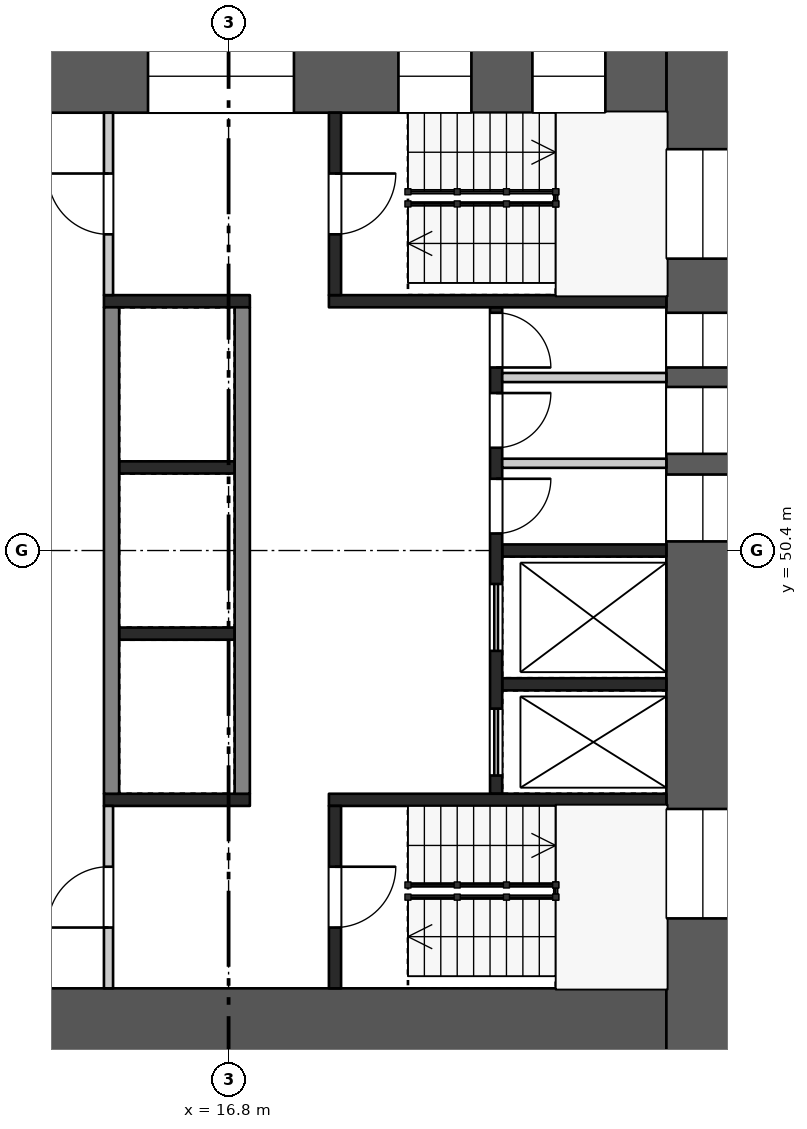
"""IFC4 building model, lengths in metres.
Left out: names, types, materials, properties, quantities, classifications, styles, units other than length and angle.
Written with IfcOpenShell. Run it as: python <this file> out.ifc"""

import sys

from ifc_helpers import new_model, si_unit, direction, frame, frame_2d, origin, place, context, subcontext, project, spatial, rectangle, extrude, element, fill, save


model = new_model("IFC4")
c1 = context("Model", 3, precision=1e-05, world=origin(), true_north=direction((0.0, 1.0)))
c2 = subcontext(c1, "Body", "Model", "MODEL_VIEW")
j1 = project(units=[si_unit("LENGTHUNIT", "METRE"), si_unit("PLANEANGLEUNIT", "RADIAN")], contexts=[c1])
p1 = place(None, origin())
s1 = spatial("IfcSite", under=j1, at=p1, CompositionType="ELEMENT")
p2 = place(p1, origin())
s2 = spatial("IfcBuilding", under=s1, at=p2, CompositionType="ELEMENT")
p3 = place(p2, frame((0.0, 0.0, 56.7)))
s3 = spatial("IfcBuildingStorey", under=s2, at=p3, CompositionType="ELEMENT", Elevation=56.7)
p4 = place(p3, frame((24.6, 58.8, 0.0), z_axis=(0.0, 0.0, 1.0), x_axis=(0.0, -1.0, 0.0)))
e1 = element("IfcWall", 1, at=p4, inside=s3, PredefinedType="SHEAR", context=c2, shape_type="SweptSolid", body=[
    extrude(rectangle(XDim=16.8, YDim=1.2, at=frame_2d((8.4, 0.0))), origin(), (0.0, 0.0, 1.0), 3.22),
])
p5 = place(p4, frame((1.8, 0.0, 0.5)))
e2 = element("IfcOpeningElement", 2, at=p5, cuts=e1, PredefinedType="OPENING", context=c2, shape_type="SweptSolid", body=[
    extrude(rectangle(XDim=1.8, YDim=2.4, at=frame_2d((0.9, 1.2))), frame((0.0, 0.61, 0.0), z_axis=(0.0, -1.0, 0.0), x_axis=(1.0, 0.0, 0.0)), (0.0, 0.0, 1.0), 1.22),
])
p6 = place(p4, frame((4.49, 0.0, 1.6)))
e3 = element("IfcOpeningElement", 3, at=p6, cuts=e1, PredefinedType="OPENING", context=c2, shape_type="SweptSolid", body=[
    extrude(rectangle(XDim=0.9, YDim=1.2, at=frame_2d((0.45, 0.6))), frame((0.0, 0.61, 0.0), z_axis=(0.0, -1.0, 0.0), x_axis=(1.0, 0.0, 0.0)), (0.0, 0.0, 1.0), 1.22),
])
p7 = place(p4, frame((5.71, 0.0, 1.6)))
e4 = element("IfcOpeningElement", 4, at=p7, cuts=e1, PredefinedType="OPENING", context=c2, shape_type="SweptSolid", body=[
    extrude(rectangle(XDim=1.1, YDim=1.2, at=frame_2d((0.55, 0.6))), frame((0.0, 0.61, 0.0), z_axis=(0.0, -1.0, 0.0), x_axis=(1.0, 0.0, 0.0)), (0.0, 0.0, 1.0), 1.22),
])
p8 = place(p4, frame((7.15, 0.0, 1.6)))
e5 = element("IfcOpeningElement", 5, at=p8, cuts=e1, PredefinedType="OPENING", context=c2, shape_type="SweptSolid", body=[
    extrude(rectangle(XDim=1.1, YDim=1.2, at=frame_2d((0.55, 0.6))), frame((0.0, 0.61, 0.0), z_axis=(0.0, -1.0, 0.0), x_axis=(1.0, 0.0, 0.0)), (0.0, 0.0, 1.0), 1.22),
])
p9 = place(p4, frame((12.65, 0.0, 0.5)))
e6 = element("IfcOpeningElement", 6, at=p9, cuts=e1, PredefinedType="OPENING", context=c2, shape_type="SweptSolid", body=[
    extrude(rectangle(XDim=1.8, YDim=2.4, at=frame_2d((0.9, 1.2))), frame((0.0, 0.61, 0.0), z_axis=(0.0, -1.0, 0.0), x_axis=(1.0, 0.0, 0.0)), (0.0, 0.0, 1.0), 1.22),
])
p10 = place(p3, frame((9.6, 58.2, 0.0), z_axis=(0.0, 0.0, 1.0), x_axis=(1.0, 0.0, 0.0)))
e7 = element("IfcWall", 7, at=p10, inside=s3, PredefinedType="SHEAR", context=c2, shape_type="SweptSolid", body=[
    extrude(rectangle(XDim=14.4, YDim=1.2, at=frame_2d((7.2, 0.0))), origin(), (0.0, 0.0, 1.0), 3.22),
])
p11 = place(p10, frame((1.105, 0.0, 0.6)))
e8 = element("IfcOpeningElement", 8, at=p11, cuts=e7, PredefinedType="OPENING", context=c2, shape_type="SweptSolid", body=[
    extrude(rectangle(XDim=3.0, YDim=2.1, at=frame_2d((1.5, 1.05))), frame((0.0, 0.61, 0.0), z_axis=(0.0, -1.0, 0.0), x_axis=(1.0, 0.0, 0.0)), (0.0, 0.0, 1.0), 1.22),
])
p12 = place(p10, frame((5.875, 0.0, 0.6)))
e9 = element("IfcOpeningElement", 9, at=p12, cuts=e7, PredefinedType="OPENING", context=c2, shape_type="SweptSolid", body=[
    extrude(rectangle(XDim=2.4, YDim=2.1, at=frame_2d((1.2, 1.05))), frame((0.0, 0.61, 0.0), z_axis=(0.0, -1.0, 0.0), x_axis=(1.0, 0.0, 0.0)), (0.0, 0.0, 1.0), 1.22),
])
p13 = place(p10, frame((9.993, 0.0, 0.5)))
e10 = element("IfcOpeningElement", 10, at=p13, cuts=e7, PredefinedType="OPENING", context=c2, shape_type="SweptSolid", body=[
    extrude(rectangle(XDim=1.2, YDim=2.4, at=frame_2d((0.6, 1.2))), frame((0.0, 0.61, 0.0), z_axis=(0.0, -1.0, 0.0), x_axis=(1.0, 0.0, 0.0)), (0.0, 0.0, 1.0), 1.22),
])
p14 = place(p10, frame((12.197, 0.0, 0.5)))
e11 = element("IfcOpeningElement", 11, at=p14, cuts=e7, PredefinedType="OPENING", context=c2, shape_type="SweptSolid", body=[
    extrude(rectangle(XDim=1.2, YDim=2.4, at=frame_2d((0.6, 1.2))), frame((0.0, 0.61, 0.0), z_axis=(0.0, -1.0, 0.0), x_axis=(1.0, 0.0, 0.0)), (0.0, 0.0, 1.0), 1.22),
])
p15 = place(p3, frame((9.6, 42.6, 0.0), z_axis=(0.0, 0.0, 1.0), x_axis=(1.0, 0.0, 0.0)))
e12 = element("IfcWall", 12, at=p15, inside=s3, PredefinedType="SHEAR", context=c2, shape_type="SweptSolid", body=[
    extrude(rectangle(XDim=14.4, YDim=1.2, at=frame_2d((7.2, 0.0))), origin(), (0.0, 0.0, 1.0), 3.22),
])
p16 = place(p15, frame((2.1, 0.0, 0.0)))
e13 = element("IfcOpeningElement", 13, at=p16, cuts=e12, PredefinedType="OPENING", context=c2, shape_type="SweptSolid", body=[
    extrude(rectangle(XDim=1.8, YDim=2.1, at=frame_2d((0.9, 1.05))), frame((0.0, 0.61, 0.0), z_axis=(0.0, -1.0, 0.0), x_axis=(1.0, 0.0, 0.0)), (0.0, 0.0, 1.0), 1.22),
])
for number, where, z_axis, x_axis in (
    (14, (15.0, 51.767, 0.0), (0.0, 0.0, 1.0), (1.0, 0.0, 0.0)),
    (15, (15.0, 49.033, 0.0), (0.0, 0.0, 1.0), (1.0, 0.0, 0.0)),
):
    element("IfcWall", number, at=place(p3, frame(where, z_axis=z_axis, x_axis=x_axis)), inside=s3, PredefinedType="SHEAR", context=c2, shape_type="SweptSolid", body=[
        extrude(rectangle(XDim=1.9, YDim=0.2, at=frame_2d((0.95, 0.0))), origin(), (0.0, 0.0, 1.0), 3.22),
    ])
for number, where, z_axis, x_axis in (
    (16, (14.875, 54.4, 0.0), (0.0, 0.0, 1.0), (0.0, -1.0, 0.0)),
    (17, (17.025, 54.4, 0.0), (0.0, 0.0, 1.0), (0.0, -1.0, 0.0)),
):
    element("IfcWall", number, at=place(p3, frame(where, z_axis=z_axis, x_axis=x_axis)), inside=s3, PredefinedType="SHEAR", context=c2, shape_type="SweptSolid", body=[
        extrude(rectangle(XDim=8.0, YDim=0.25, at=frame_2d((4.0, 0.0))), origin(), (0.0, 0.0, 1.0), 3.22),
    ])
for number, where, z_axis, x_axis in (
    (18, (21.3, 50.4, 0.0), (0.0, 0.0, 1.0), (1.0, 0.0, 0.0)),
    (19, (21.3, 48.2, 0.0), (0.0, 0.0, 1.0), (1.0, 0.0, 0.0)),
):
    element("IfcWall", number, at=place(p3, frame(where, z_axis=z_axis, x_axis=x_axis)), inside=s3, PredefinedType="SHEAR", context=c2, shape_type="SweptSolid", body=[
        extrude(rectangle(XDim=2.7, YDim=0.2, at=frame_2d((1.35, 0.0))), origin(), (0.0, 0.0, 1.0), 3.22),
    ])
for number, where, z_axis, x_axis in (
    (20, (21.3, 53.245, 0.0), (0.0, 0.0, 1.0), (1.0, 0.0, 0.0)),
    (21, (21.3, 51.835, 0.0), (0.0, 0.0, 1.0), (1.0, 0.0, 0.0)),
):
    element("IfcWall", number, at=place(p3, frame(where, z_axis=z_axis, x_axis=x_axis)), inside=s3, PredefinedType="PARTITIONING", context=c2, shape_type="SweptSolid", body=[
        extrude(rectangle(XDim=2.7, YDim=0.15, at=frame_2d((1.35, 0.0))), origin(), (0.0, 0.0, 1.0), 3.22),
    ])
p17 = place(p3, frame((21.2, 54.4, 0.0), z_axis=(0.0, 0.0, 1.0), x_axis=(0.0, -1.0, 0.0)))
e22 = element("IfcWall", 22, at=p17, inside=s3, PredefinedType="SHEAR", context=c2, shape_type="SweptSolid", body=[
    extrude(rectangle(XDim=8.0, YDim=0.2, at=frame_2d((4.0, 0.0))), origin(), (0.0, 0.0, 1.0), 3.22),
])
p18 = place(p17, frame((0.09, 0.0, 0.0)))
e23 = element("IfcOpeningElement", 23, at=p18, cuts=e22, PredefinedType="OPENING", context=c2, shape_type="SweptSolid", body=[
    extrude(rectangle(XDim=0.9, YDim=2.1, at=frame_2d((0.45, 1.05))), frame((0.0, 0.11, 0.0), z_axis=(0.0, -1.0, 0.0), x_axis=(1.0, 0.0, 0.0)), (0.0, 0.0, 1.0), 0.22),
])
p19 = place(p17, frame((1.41, 0.0, 0.0)))
e24 = element("IfcOpeningElement", 24, at=p19, cuts=e22, PredefinedType="OPENING", context=c2, shape_type="SweptSolid", body=[
    extrude(rectangle(XDim=0.9, YDim=2.1, at=frame_2d((0.45, 1.05))), frame((0.0, 0.11, 0.0), z_axis=(0.0, -1.0, 0.0), x_axis=(1.0, 0.0, 0.0)), (0.0, 0.0, 1.0), 0.22),
])
p20 = place(p17, frame((2.82, 0.0, 0.0)))
e25 = element("IfcOpeningElement", 25, at=p20, cuts=e22, PredefinedType="OPENING", context=c2, shape_type="SweptSolid", body=[
    extrude(rectangle(XDim=0.9, YDim=2.1, at=frame_2d((0.45, 1.05))), frame((0.0, 0.11, 0.0), z_axis=(0.0, -1.0, 0.0), x_axis=(1.0, 0.0, 0.0)), (0.0, 0.0, 1.0), 0.22),
])
p21 = place(p17, frame((4.55, 0.0, 0.0)))
e26 = element("IfcOpeningElement", 26, at=p21, cuts=e22, PredefinedType="OPENING", context=c2, shape_type="SweptSolid", body=[
    extrude(rectangle(XDim=1.1, YDim=2.1, at=frame_2d((0.55, 1.05))), frame((0.0, 0.11, 0.0), z_axis=(0.0, -1.0, 0.0), x_axis=(1.0, 0.0, 0.0)), (0.0, 0.0, 1.0), 0.22),
])
p22 = place(p17, frame((6.6, 0.0, 0.0)))
e27 = element("IfcOpeningElement", 27, at=p22, cuts=e22, PredefinedType="OPENING", context=c2, shape_type="SweptSolid", body=[
    extrude(rectangle(XDim=1.1, YDim=2.1, at=frame_2d((0.55, 1.05))), frame((0.0, 0.11, 0.0), z_axis=(0.0, -1.0, 0.0), x_axis=(1.0, 0.0, 0.0)), (0.0, 0.0, 1.0), 0.22),
])
p23 = place(p3, frame((14.75, 54.5, 0.0), z_axis=(0.0, 0.0, 1.0), x_axis=(1.0, 0.0, 0.0)))
e28 = element("IfcWall", 28, at=p23, inside=s3, PredefinedType="SHEAR", context=c2, shape_type="SweptSolid", body=[
    extrude(rectangle(XDim=2.4, YDim=0.2, at=frame_2d((1.2, 0.0))), origin(), (0.0, 0.0, 1.0), 3.22),
])
p24 = place(p3, frame((18.45, 54.5, 0.0), z_axis=(0.0, 0.0, 1.0), x_axis=(1.0, 0.0, 0.0)))
e29 = element("IfcWall", 29, at=p24, inside=s3, PredefinedType="SHEAR", context=c2, shape_type="SweptSolid", body=[
    extrude(rectangle(XDim=5.55, YDim=0.2, at=frame_2d((2.775, 0.0))), origin(), (0.0, 0.0, 1.0), 3.22),
])
p25 = place(p3, frame((14.825, 57.6, 0.0), z_axis=(0.0, 0.0, 1.0), x_axis=(0.0, -1.0, 0.0)))
e30 = element("IfcWall", 30, at=p25, inside=s3, PredefinedType="PARTITIONING", context=c2, shape_type="SweptSolid", body=[
    extrude(rectangle(XDim=3.0, YDim=0.15, at=frame_2d((1.5, 0.0))), origin(), (0.0, 0.0, 1.0), 3.22),
])
p26 = place(p25, frame((1.0, 0.0, 0.0)))
e31 = element("IfcOpeningElement", 31, at=p26, cuts=e30, PredefinedType="OPENING", context=c2, shape_type="SweptSolid", body=[
    extrude(rectangle(XDim=1.0, YDim=2.1, at=frame_2d((0.5, 1.05))), frame((0.0, 0.085, 0.0), z_axis=(0.0, -1.0, 0.0), x_axis=(1.0, 0.0, 0.0)), (0.0, 0.0, 1.0), 0.17),
])
p27 = place(p3, frame((18.55, 57.6, 0.0), z_axis=(0.0, 0.0, 1.0), x_axis=(0.0, -1.0, 0.0)))
e32 = element("IfcWall", 32, at=p27, inside=s3, PredefinedType="SHEAR", context=c2, shape_type="SweptSolid", body=[
    extrude(rectangle(XDim=3.0, YDim=0.2, at=frame_2d((1.5, 0.0))), origin(), (0.0, 0.0, 1.0), 3.22),
])
p28 = place(p27, frame((1.0, 0.0, 0.0)))
e33 = element("IfcOpeningElement", 33, at=p28, cuts=e32, PredefinedType="OPENING", context=c2, shape_type="SweptSolid", body=[
    extrude(rectangle(XDim=1.0, YDim=2.1, at=frame_2d((0.5, 1.05))), frame((0.0, 0.11, 0.0), z_axis=(0.0, -1.0, 0.0), x_axis=(1.0, 0.0, 0.0)), (0.0, 0.0, 1.0), 0.22),
])
p29 = place(p3, frame((14.75, 46.3, 0.0), z_axis=(0.0, 0.0, 1.0), x_axis=(1.0, 0.0, 0.0)))
e34 = element("IfcWall", 34, at=p29, inside=s3, PredefinedType="SHEAR", context=c2, shape_type="SweptSolid", body=[
    extrude(rectangle(XDim=2.4, YDim=0.2, at=frame_2d((1.2, 0.0))), origin(), (0.0, 0.0, 1.0), 3.22),
])
p30 = place(p3, frame((18.45, 46.3, 0.0), z_axis=(0.0, 0.0, 1.0), x_axis=(1.0, 0.0, 0.0)))
e35 = element("IfcWall", 35, at=p30, inside=s3, PredefinedType="SHEAR", context=c2, shape_type="SweptSolid", body=[
    extrude(rectangle(XDim=5.55, YDim=0.2, at=frame_2d((2.775, 0.0))), origin(), (0.0, 0.0, 1.0), 3.22),
])
p31 = place(p3, frame((14.825, 46.2, 0.0), z_axis=(0.0, 0.0, 1.0), x_axis=(0.0, -1.0, 0.0)))
e36 = element("IfcWall", 36, at=p31, inside=s3, PredefinedType="PARTITIONING", context=c2, shape_type="SweptSolid", body=[
    extrude(rectangle(XDim=3.0, YDim=0.15, at=frame_2d((1.5, 0.0))), origin(), (0.0, 0.0, 1.0), 3.22),
])
p32 = place(p31, frame((1.0, 0.0, 0.0)))
e37 = element("IfcOpeningElement", 37, at=p32, cuts=e36, PredefinedType="OPENING", context=c2, shape_type="SweptSolid", body=[
    extrude(rectangle(XDim=1.0, YDim=2.1, at=frame_2d((0.5, 1.05))), frame((0.0, 0.085, 0.0), z_axis=(0.0, -1.0, 0.0), x_axis=(1.0, 0.0, 0.0)), (0.0, 0.0, 1.0), 0.17),
])
p33 = place(p3, frame((18.55, 46.2, 0.0), z_axis=(0.0, 0.0, 1.0), x_axis=(0.0, -1.0, 0.0)))
e38 = element("IfcWall", 38, at=p33, inside=s3, PredefinedType="SHEAR", context=c2, shape_type="SweptSolid", body=[
    extrude(rectangle(XDim=3.0, YDim=0.2, at=frame_2d((1.5, 0.0))), origin(), (0.0, 0.0, 1.0), 3.22),
])
p34 = place(p33, frame((1.0, 0.0, 0.0)))
e39 = element("IfcOpeningElement", 39, at=p34, cuts=e38, PredefinedType="OPENING", context=c2, shape_type="SweptSolid", body=[
    extrude(rectangle(XDim=1.0, YDim=2.1, at=frame_2d((0.5, 1.05))), frame((0.0, 0.11, 0.0), z_axis=(0.0, -1.0, 0.0), x_axis=(1.0, 0.0, 0.0)), (0.0, 0.0, 1.0), 0.22),
])
p35 = place(p18, origin())
e40 = element("IfcDoor", 40, at=p35, inside=s3, OperationType="SINGLE_SWING_RIGHT", PredefinedType="DOOR", context=c2, shape_type="SweptSolid", body=[
    extrude(rectangle(XDim=0.9, YDim=2.1, at=frame_2d((0.45, 1.05))), frame((0.0, 0.025, 0.0), z_axis=(0.0, -1.0, 0.0), x_axis=(1.0, 0.0, 0.0)), (0.0, 0.0, 1.0), 0.05),
])
fill(e23, e40)
p36 = place(p19, origin())
e41 = element("IfcDoor", 41, at=p36, inside=s3, OperationType="SINGLE_SWING_LEFT", PredefinedType="DOOR", context=c2, shape_type="SweptSolid", body=[
    extrude(rectangle(XDim=0.9, YDim=2.1, at=frame_2d((0.45, 1.05))), frame((0.0, 0.025, 0.0), z_axis=(0.0, -1.0, 0.0), x_axis=(1.0, 0.0, 0.0)), (0.0, 0.0, 1.0), 0.05),
])
fill(e24, e41)
p37 = place(p20, origin())
e42 = element("IfcDoor", 42, at=p37, inside=s3, OperationType="SINGLE_SWING_LEFT", PredefinedType="DOOR", context=c2, shape_type="SweptSolid", body=[
    extrude(rectangle(XDim=0.9, YDim=2.1, at=frame_2d((0.45, 1.05))), frame((0.0, 0.025, 0.0), z_axis=(0.0, -1.0, 0.0), x_axis=(1.0, 0.0, 0.0)), (0.0, 0.0, 1.0), 0.05),
])
fill(e25, e42)
p38 = place(p21, origin())
e43 = element("IfcDoor", 43, at=p38, inside=s3, OperationType="DOUBLE_DOOR_SLIDING", PredefinedType="DOOR", context=c2, shape_type="SweptSolid", body=[
    extrude(rectangle(XDim=1.1, YDim=2.1, at=frame_2d((0.55, 1.05))), frame((0.0, 0.025, 0.0), z_axis=(0.0, -1.0, 0.0), x_axis=(1.0, 0.0, 0.0)), (0.0, 0.0, 1.0), 0.05),
])
fill(e26, e43)
p39 = place(p22, origin())
e44 = element("IfcDoor", 44, at=p39, inside=s3, OperationType="DOUBLE_DOOR_SLIDING", PredefinedType="DOOR", context=c2, shape_type="SweptSolid", body=[
    extrude(rectangle(XDim=1.1, YDim=2.1, at=frame_2d((0.55, 1.05))), frame((0.0, 0.025, 0.0), z_axis=(0.0, -1.0, 0.0), x_axis=(1.0, 0.0, 0.0)), (0.0, 0.0, 1.0), 0.05),
])
fill(e27, e44)
p40 = place(p26, frame((1.0, 0.0, 0.0), z_axis=(0.0, 0.0, 1.0), x_axis=(-1.0, 0.0, 0.0)))
e45 = element("IfcDoor", 45, at=p40, inside=s3, OperationType="SINGLE_SWING_RIGHT", PredefinedType="DOOR", context=c2, shape_type="SweptSolid", body=[
    extrude(rectangle(XDim=1.0, YDim=2.1, at=frame_2d((0.5, 1.05))), frame((0.0, 0.025, 0.0), z_axis=(0.0, -1.0, 0.0), x_axis=(1.0, 0.0, 0.0)), (0.0, 0.0, 1.0), 0.05),
])
fill(e31, e45)
p41 = place(p28, origin())
e46 = element("IfcDoor", 46, at=p41, inside=s3, OperationType="SINGLE_SWING_LEFT", PredefinedType="DOOR", context=c2, shape_type="SweptSolid", body=[
    extrude(rectangle(XDim=1.0, YDim=2.1, at=frame_2d((0.5, 1.05))), frame((0.0, 0.025, 0.0), z_axis=(0.0, -1.0, 0.0), x_axis=(1.0, 0.0, 0.0)), (0.0, 0.0, 1.0), 0.05),
])
fill(e33, e46)
p42 = place(p32, frame((1.0, 0.0, 0.0), z_axis=(0.0, 0.0, 1.0), x_axis=(-1.0, 0.0, 0.0)))
e47 = element("IfcDoor", 47, at=p42, inside=s3, OperationType="SINGLE_SWING_LEFT", PredefinedType="DOOR", context=c2, shape_type="SweptSolid", body=[
    extrude(rectangle(XDim=1.0, YDim=2.1, at=frame_2d((0.5, 1.05))), frame((0.0, 0.025, 0.0), z_axis=(0.0, -1.0, 0.0), x_axis=(1.0, 0.0, 0.0)), (0.0, 0.0, 1.0), 0.05),
])
fill(e37, e47)
p43 = place(p34, origin())
e48 = element("IfcDoor", 48, at=p43, inside=s3, OperationType="SINGLE_SWING_LEFT", PredefinedType="DOOR", context=c2, shape_type="SweptSolid", body=[
    extrude(rectangle(XDim=1.0, YDim=2.1, at=frame_2d((0.5, 1.05))), frame((0.0, 0.025, 0.0), z_axis=(0.0, -1.0, 0.0), x_axis=(1.0, 0.0, 0.0)), (0.0, 0.0, 1.0), 0.05),
])
fill(e39, e48)
p44 = place(p5, origin())
e49 = element("IfcWindow", 49, at=p44, inside=s3, PartitioningType="SINGLE_PANEL", PredefinedType="WINDOW", context=c2, shape_type="SweptSolid", body=[
    extrude(rectangle(XDim=1.8, YDim=2.4, at=frame_2d((0.9, 1.2))), frame((0.0, 0.03, 0.0), z_axis=(0.0, -1.0, 0.0), x_axis=(1.0, 0.0, 0.0)), (0.0, 0.0, 1.0), 0.06),
])
fill(e2, e49)
p45 = place(p6, origin())
e50 = element("IfcWindow", 50, at=p45, inside=s3, PartitioningType="SINGLE_PANEL", PredefinedType="WINDOW", context=c2, shape_type="SweptSolid", body=[
    extrude(rectangle(XDim=0.9, YDim=1.2, at=frame_2d((0.45, 0.6))), frame((0.0, 0.03, 0.0), z_axis=(0.0, -1.0, 0.0), x_axis=(1.0, 0.0, 0.0)), (0.0, 0.0, 1.0), 0.06),
])
fill(e3, e50)
p46 = place(p7, origin())
e51 = element("IfcWindow", 51, at=p46, inside=s3, PartitioningType="SINGLE_PANEL", PredefinedType="WINDOW", context=c2, shape_type="SweptSolid", body=[
    extrude(rectangle(XDim=1.1, YDim=1.2, at=frame_2d((0.55, 0.6))), frame((0.0, 0.03, 0.0), z_axis=(0.0, -1.0, 0.0), x_axis=(1.0, 0.0, 0.0)), (0.0, 0.0, 1.0), 0.06),
])
fill(e4, e51)
p47 = place(p8, origin())
e52 = element("IfcWindow", 52, at=p47, inside=s3, PartitioningType="SINGLE_PANEL", PredefinedType="WINDOW", context=c2, shape_type="SweptSolid", body=[
    extrude(rectangle(XDim=1.1, YDim=1.2, at=frame_2d((0.55, 0.6))), frame((0.0, 0.03, 0.0), z_axis=(0.0, -1.0, 0.0), x_axis=(1.0, 0.0, 0.0)), (0.0, 0.0, 1.0), 0.06),
])
fill(e5, e52)
p48 = place(p9, origin())
e53 = element("IfcWindow", 53, at=p48, inside=s3, PartitioningType="SINGLE_PANEL", PredefinedType="WINDOW", context=c2, shape_type="SweptSolid", body=[
    extrude(rectangle(XDim=1.8, YDim=2.4, at=frame_2d((0.9, 1.2))), frame((0.0, 0.03, 0.0), z_axis=(0.0, -1.0, 0.0), x_axis=(1.0, 0.0, 0.0)), (0.0, 0.0, 1.0), 0.06),
])
fill(e6, e53)
p49 = place(p12, origin())
e54 = element("IfcWindow", 54, at=p49, inside=s3, PartitioningType="SINGLE_PANEL", PredefinedType="WINDOW", context=c2, shape_type="SweptSolid", body=[
    extrude(rectangle(XDim=2.4, YDim=2.1, at=frame_2d((1.2, 1.05))), frame((0.0, 0.03, 0.0), z_axis=(0.0, -1.0, 0.0), x_axis=(1.0, 0.0, 0.0)), (0.0, 0.0, 1.0), 0.06),
])
fill(e9, e54)
p50 = place(p13, origin())
e55 = element("IfcWindow", 55, at=p50, inside=s3, PartitioningType="SINGLE_PANEL", PredefinedType="WINDOW", context=c2, shape_type="SweptSolid", body=[
    extrude(rectangle(XDim=1.2, YDim=2.4, at=frame_2d((0.6, 1.2))), frame((0.0, 0.03, 0.0), z_axis=(0.0, -1.0, 0.0), x_axis=(1.0, 0.0, 0.0)), (0.0, 0.0, 1.0), 0.06),
])
fill(e10, e55)
p51 = place(p14, origin())
e56 = element("IfcWindow", 56, at=p51, inside=s3, PartitioningType="SINGLE_PANEL", PredefinedType="WINDOW", context=c2, shape_type="SweptSolid", body=[
    extrude(rectangle(XDim=1.2, YDim=2.4, at=frame_2d((0.6, 1.2))), frame((0.0, 0.03, 0.0), z_axis=(0.0, -1.0, 0.0), x_axis=(1.0, 0.0, 0.0)), (0.0, 0.0, 1.0), 0.06),
])
fill(e11, e56)
save(model, sys.argv[1])
